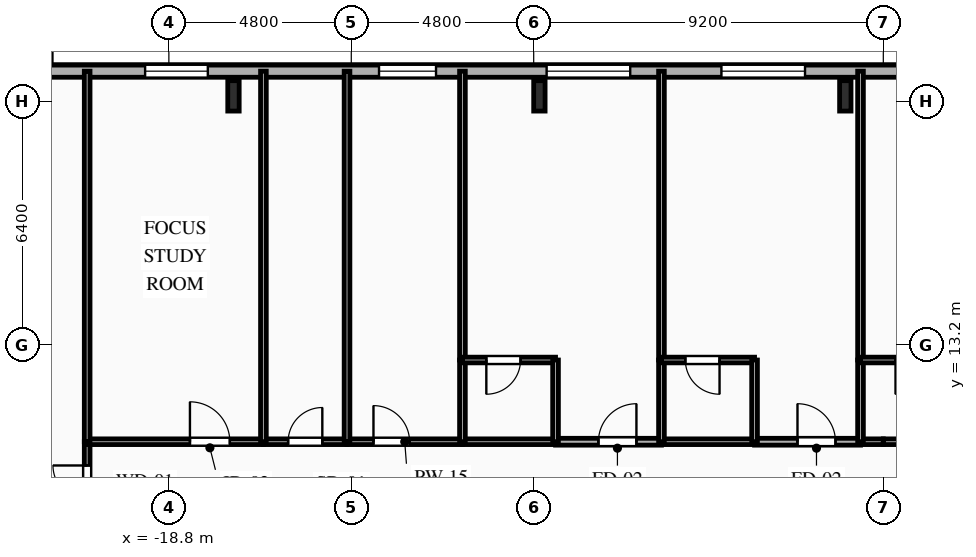
"""IFC4 building model, lengths in metres.
Left out: names, types, materials, properties, quantities, classifications, styles, units other than length and angle.
Written with IfcOpenShell. Run it as: python <this file> out.ifc"""

import sys

from ifc_helpers import new_model, si_unit, direction, frame, frame_2d, origin, origin_2d, place, context, subcontext, project, spatial, rectangle, i_section, extrude, element, fill, save


model = new_model("IFC4")
c1 = context("Model", 3, precision=1e-05, world=origin(), true_north=direction((0.0, 1.0)))
c2 = subcontext(c1, "Body", "Model", "MODEL_VIEW")
j1 = project(units=[si_unit("LENGTHUNIT", "METRE"), si_unit("PLANEANGLEUNIT", "RADIAN")], contexts=[c1])
p1 = place(None, origin())
s1 = spatial("IfcSite", under=j1, at=p1, CompositionType="ELEMENT")
p2 = place(p1, origin())
s2 = spatial("IfcBuilding", under=s1, at=p2, CompositionType="ELEMENT")
p3 = place(p2, frame((0.0, 0.0, 144.4)))
s3 = spatial("IfcBuildingStorey", under=s2, at=p3, CompositionType="ELEMENT", Elevation=144.4)
for number, where, z_axis, x_axis in (
    (1, (-1.0, 19.75, 0.0), (0.0, 0.0, 1.0), (1.0, 0.0, 0.0)),
    (2, (-9.05, 19.75, 0.0), (0.0, 0.0, 1.0), (1.0, 0.0, 0.0)),
    (3, (-17.1, 19.75, 0.0), (0.0, 0.0, 1.0), (1.0, 0.0, 0.0)),
):
    element("IfcColumn", number, at=place(p3, frame(where, z_axis=z_axis, x_axis=x_axis)), inside=s3, PredefinedType="COLUMN", context=c2, shape_type="SweptSolid", body=[
        extrude(i_section(OverallWidth=0.3, OverallDepth=0.8, WebThickness=0.018, FlangeThickness=0.033, FilletRadius=0.03, at=origin_2d()), origin(), (0.0, 0.0, 1.0), 3.35),
    ])
p4 = place(p3, frame((-25.8, 20.4, 0.0), z_axis=(0.0, 0.0, 1.0), x_axis=(1.0, 0.0, 0.0)))
e4 = element("IfcWall", 4, at=p4, inside=s3, PredefinedType="SOLIDWALL", context=c2, shape_type="SweptSolid", body=[
    extrude(rectangle(XDim=49.6, YDim=0.32, at=frame_2d((24.8, 0.0))), origin(), (0.0, 0.0, 1.0), 3.04),
])
p5 = place(p4, frame((2.135, 0.0, 0.85)))
e5 = element("IfcOpeningElement", 5, at=p5, cuts=e4, PredefinedType="OPENING", context=c2, shape_type="SweptSolid", body=[
    extrude(rectangle(XDim=1.65, YDim=1.85, at=frame_2d((0.825, 0.925))), frame((0.0, 0.17, 0.0), z_axis=(0.0, -1.0, 0.0), x_axis=(1.0, 0.0, 0.0)), (0.0, 0.0, 1.0), 0.34),
])
p6 = place(p4, frame((6.375, 0.0, 0.85)))
e6 = element("IfcOpeningElement", 6, at=p6, cuts=e4, PredefinedType="OPENING", context=c2, shape_type="SweptSolid", body=[
    extrude(rectangle(XDim=1.65, YDim=1.85, at=frame_2d((0.825, 0.925))), frame((0.0, 0.17, 0.0), z_axis=(0.0, -1.0, 0.0), x_axis=(1.0, 0.0, 0.0)), (0.0, 0.0, 1.0), 0.34),
])
p7 = place(p4, frame((12.53, 0.0, 0.85)))
e7 = element("IfcOpeningElement", 7, at=p7, cuts=e4, PredefinedType="OPENING", context=c2, shape_type="SweptSolid", body=[
    extrude(rectangle(XDim=1.5, YDim=1.85, at=frame_2d((0.75, 0.925))), frame((0.0, 0.17, 0.0), z_axis=(0.0, -1.0, 0.0), x_axis=(1.0, 0.0, 0.0)), (0.0, 0.0, 1.0), 0.34),
])
p8 = place(p4, frame((16.94, 0.0, 0.85)))
e8 = element("IfcOpeningElement", 8, at=p8, cuts=e4, PredefinedType="OPENING", context=c2, shape_type="SweptSolid", body=[
    extrude(rectangle(XDim=2.2, YDim=1.85, at=frame_2d((1.1, 0.925))), frame((0.0, 0.17, 0.0), z_axis=(0.0, -1.0, 0.0), x_axis=(1.0, 0.0, 0.0)), (0.0, 0.0, 1.0), 0.34),
])
p9 = place(p4, frame((21.54, 0.0, 0.85)))
e9 = element("IfcOpeningElement", 9, at=p9, cuts=e4, PredefinedType="OPENING", context=c2, shape_type="SweptSolid", body=[
    extrude(rectangle(XDim=2.2, YDim=1.85, at=frame_2d((1.1, 0.925))), frame((0.0, 0.17, 0.0), z_axis=(0.0, -1.0, 0.0), x_axis=(1.0, 0.0, 0.0)), (0.0, 0.0, 1.0), 0.34),
])
p10 = place(p4, frame((26.78, 0.0, 0.85)))
e10 = element("IfcOpeningElement", 10, at=p10, cuts=e4, PredefinedType="OPENING", context=c2, shape_type="SweptSolid", body=[
    extrude(rectangle(XDim=2.2, YDim=1.85, at=frame_2d((1.1, 0.925))), frame((0.0, 0.17, 0.0), z_axis=(0.0, -1.0, 0.0), x_axis=(1.0, 0.0, 0.0)), (0.0, 0.0, 1.0), 0.34),
])
p11 = place(p4, frame((33.132, 0.0, 0.85)))
e11 = element("IfcOpeningElement", 11, at=p11, cuts=e4, PredefinedType="OPENING", context=c2, shape_type="SweptSolid", body=[
    extrude(rectangle(XDim=2.2, YDim=1.85, at=frame_2d((1.1, 0.925))), frame((0.0, 0.17, 0.0), z_axis=(0.0, -1.0, 0.0), x_axis=(1.0, 0.0, 0.0)), (0.0, 0.0, 1.0), 0.34),
])
p12 = place(p4, frame((37.22, 0.0, 0.85)))
e12 = element("IfcOpeningElement", 12, at=p12, cuts=e4, PredefinedType="OPENING", context=c2, shape_type="SweptSolid", body=[
    extrude(rectangle(XDim=2.2, YDim=1.85, at=frame_2d((1.1, 0.925))), frame((0.0, 0.17, 0.0), z_axis=(0.0, -1.0, 0.0), x_axis=(1.0, 0.0, 0.0)), (0.0, 0.0, 1.0), 0.34),
])
p13 = place(p4, frame((43.055, 0.0, 0.85)))
e13 = element("IfcOpeningElement", 13, at=p13, cuts=e4, PredefinedType="OPENING", context=c2, shape_type="SweptSolid", body=[
    extrude(rectangle(XDim=1.65, YDim=1.85, at=frame_2d((0.825, 0.925))), frame((0.0, 0.17, 0.0), z_axis=(0.0, -1.0, 0.0), x_axis=(1.0, 0.0, 0.0)), (0.0, 0.0, 1.0), 0.34),
])
p14 = place(p4, frame((47.45, 0.0, 0.85)))
e14 = element("IfcOpeningElement", 14, at=p14, cuts=e4, PredefinedType="OPENING", context=c2, shape_type="SweptSolid", body=[
    extrude(rectangle(XDim=1.1, YDim=1.85, at=frame_2d((0.55, 0.925))), frame((0.0, 0.17, 0.0), z_axis=(0.0, -1.0, 0.0), x_axis=(1.0, 0.0, 0.0)), (0.0, 0.0, 1.0), 0.34),
])
p15 = place(p3, frame((-20.95, 8.5, 0.0), z_axis=(0.0, 0.0, 1.0), x_axis=(0.0, 1.0, 0.0)))
e15 = element("IfcWall", 15, at=p15, inside=s3, PredefinedType="PARTITIONING", context=c2, shape_type="SweptSolid", body=[
    extrude(rectangle(XDim=2.15, YDim=0.15, at=frame_2d((1.075, 0.0))), origin(), (0.0, 0.0, 1.0), 3.04),
])
p16 = place(p15, frame((0.625, 0.0, 0.0)))
e16 = element("IfcOpeningElement", 16, at=p16, cuts=e15, PredefinedType="OPENING", context=c2, shape_type="SweptSolid", body=[
    extrude(rectangle(XDim=0.9, YDim=2.1, at=frame_2d((0.45, 1.05))), frame((0.0, 0.085, 0.0), z_axis=(0.0, -1.0, 0.0), x_axis=(1.0, 0.0, 0.0)), (0.0, 0.0, 1.0), 0.17),
])
p17 = place(p3, frame((-20.95, 10.65, 0.0), z_axis=(0.0, 0.0, 1.0), x_axis=(1.0, 0.0, 0.0)))
e17 = element("IfcWall", 17, at=p17, inside=s3, PredefinedType="PARTITIONING", context=c2, shape_type="SweptSolid", body=[
    extrude(rectangle(XDim=4.638, YDim=0.15, at=frame_2d((2.319, 0.0))), origin(), (0.0, 0.0, 1.0), 3.04),
])
p18 = place(p17, frame((2.705, 0.0, 0.0)))
e18 = element("IfcOpeningElement", 18, at=p18, cuts=e17, PredefinedType="OPENING", context=c2, shape_type="SweptSolid", body=[
    extrude(rectangle(XDim=1.05, YDim=2.15, at=frame_2d((0.525, 1.075))), frame((0.0, 0.085, 0.0), z_axis=(0.0, -1.0, 0.0), x_axis=(1.0, 0.0, 0.0)), (0.0, 0.0, 1.0), 0.17),
])
p19 = place(p3, frame((-16.312, 10.65, 0.0), z_axis=(0.0, 0.0, 1.0), x_axis=(1.0, 0.0, 0.0)))
e19 = element("IfcWall", 19, at=p19, inside=s3, PredefinedType="PLUMBINGWALL", context=c2, shape_type="SweptSolid", body=[
    extrude(rectangle(XDim=2.2, YDim=0.15, at=frame_2d((1.1, 0.0))), origin(), (0.0, 0.0, 1.0), 3.04),
])
p20 = place(p19, frame((0.65, 0.0, 0.0)))
e20 = element("IfcOpeningElement", 20, at=p20, cuts=e19, PredefinedType="OPENING", context=c2, shape_type="SweptSolid", body=[
    extrude(rectangle(XDim=0.9, YDim=2.1, at=frame_2d((0.45, 1.05))), frame((0.0, 0.085, 0.0), z_axis=(0.0, -1.0, 0.0), x_axis=(1.0, 0.0, 0.0)), (0.0, 0.0, 1.0), 0.17),
])
p21 = place(p3, frame((-14.112, 10.65, 0.0), z_axis=(0.0, 0.0, 1.0), x_axis=(1.0, 0.0, 0.0)))
e21 = element("IfcWall", 21, at=p21, inside=s3, PredefinedType="PARTITIONING", context=c2, shape_type="SweptSolid", body=[
    extrude(rectangle(XDim=3.037, YDim=0.15, at=frame_2d((1.519, 0.0))), origin(), (0.0, 0.0, 1.0), 3.04),
])
p22 = place(p21, frame((0.696, 0.0, 0.0)))
e22 = element("IfcOpeningElement", 22, at=p22, cuts=e21, PredefinedType="OPENING", context=c2, shape_type="SweptSolid", body=[
    extrude(rectangle(XDim=0.95, YDim=2.1, at=frame_2d((0.475, 1.05))), frame((0.0, 0.085, 0.0), z_axis=(0.0, -1.0, 0.0), x_axis=(1.0, 0.0, 0.0)), (0.0, 0.0, 1.0), 0.17),
])
p23 = place(p3, frame((-8.625, 10.65, 0.0), z_axis=(0.0, 0.0, 1.0), x_axis=(1.0, 0.0, 0.0)))
e23 = element("IfcWall", 23, at=p23, inside=s3, PredefinedType="PARTITIONING", context=c2, shape_type="SweptSolid", body=[
    extrude(rectangle(XDim=2.787, YDim=0.18, at=frame_2d((1.394, 0.0))), origin(), (0.0, 0.0, 1.0), 3.04),
])
p24 = place(p23, frame((1.129, 0.0, 0.0)))
e24 = element("IfcOpeningElement", 24, at=p24, cuts=e23, PredefinedType="OPENING", context=c2, shape_type="SweptSolid", body=[
    extrude(rectangle(XDim=1.0, YDim=2.15, at=frame_2d((0.5, 1.075))), frame((0.0, 0.1, 0.0), z_axis=(0.0, -1.0, 0.0), x_axis=(1.0, 0.0, 0.0)), (0.0, 0.0, 1.0), 0.2),
])
p25 = place(p3, frame((-11.075, 10.65, 0.0), z_axis=(0.0, 0.0, 1.0), x_axis=(1.0, 0.0, 0.0)))
e25 = element("IfcWall", 25, at=p25, inside=s3, PredefinedType="PLUMBINGWALL", context=c2, shape_type="SweptSolid", body=[
    extrude(rectangle(XDim=2.45, YDim=0.15, at=frame_2d((1.225, 0.0))), origin(), (0.0, 0.0, 1.0), 3.04),
])
p26 = place(p3, frame((-3.388, 10.65, 0.0), z_axis=(0.0, 0.0, 1.0), x_axis=(1.0, 0.0, 0.0)))
e26 = element("IfcWall", 26, at=p26, inside=s3, PredefinedType="PARTITIONING", context=c2, shape_type="SweptSolid", body=[
    extrude(rectangle(XDim=2.788, YDim=0.18, at=frame_2d((1.394, 0.0))), origin(), (0.0, 0.0, 1.0), 3.04),
])
p27 = place(p26, frame((1.129, 0.0, 0.0)))
e27 = element("IfcOpeningElement", 27, at=p27, cuts=e26, PredefinedType="OPENING", context=c2, shape_type="SweptSolid", body=[
    extrude(rectangle(XDim=1.0, YDim=2.15, at=frame_2d((0.5, 1.075))), frame((0.0, 0.1, 0.0), z_axis=(0.0, -1.0, 0.0), x_axis=(1.0, 0.0, 0.0)), (0.0, 0.0, 1.0), 0.2),
])
p28 = place(p3, frame((-5.838, 10.65, 0.0), z_axis=(0.0, 0.0, 1.0), x_axis=(1.0, 0.0, 0.0)))
e28 = element("IfcWall", 28, at=p28, inside=s3, PredefinedType="PLUMBINGWALL", context=c2, shape_type="SweptSolid", body=[
    extrude(rectangle(XDim=2.45, YDim=0.15, at=frame_2d((1.225, 0.0))), origin(), (0.0, 0.0, 1.0), 3.04),
])
p29 = place(p3, frame((-0.6, 10.65, 0.0), z_axis=(0.0, 0.0, 1.0), x_axis=(1.0, 0.0, 0.0)))
e29 = element("IfcWall", 29, at=p29, inside=s3, PredefinedType="PLUMBINGWALL", context=c2, shape_type="SweptSolid", body=[
    extrude(rectangle(XDim=0.6, YDim=0.15, at=frame_2d((0.3, 0.0))), origin(), (0.0, 0.0, 1.0), 3.04),
])
p30 = place(p3, frame((0.0, 10.65, 0.0), z_axis=(0.0, 0.0, 1.0), x_axis=(1.0, 0.0, 0.0)))
e30 = element("IfcWall", 30, at=p30, inside=s3, PredefinedType="PLUMBINGWALL", context=c2, shape_type="SweptSolid", body=[
    extrude(rectangle(XDim=1.85, YDim=0.15, at=frame_2d((0.925, 0.0))), origin(), (0.0, 0.0, 1.0), 3.04),
])
p31 = place(p3, frame((-20.95, 20.4, 0.0), z_axis=(0.0, 0.0, 1.0), x_axis=(0.0, -1.0, 0.0)))
e31 = element("IfcWall", 31, at=p31, inside=s3, PredefinedType="PARTITIONING", context=c2, shape_type="SweptSolid", body=[
    extrude(rectangle(XDim=9.75, YDim=0.15, at=frame_2d((4.875, 0.0))), origin(), (0.0, 0.0, 1.0), 3.04),
])
for number, where, z_axis, x_axis in (
    (32, (-16.312, 20.4, 0.0), (0.0, 0.0, 1.0), (0.0, -1.0, 0.0)),
    (33, (-14.112, 20.4, 0.0), (0.0, 0.0, 1.0), (0.0, -1.0, 0.0)),
):
    element("IfcWall", number, at=place(p3, frame(where, z_axis=z_axis, x_axis=x_axis)), inside=s3, PredefinedType="PLUMBINGWALL", context=c2, shape_type="SweptSolid", body=[
        extrude(rectangle(XDim=9.75, YDim=0.15, at=frame_2d((4.875, 0.0))), origin(), (0.0, 0.0, 1.0), 3.04),
    ])
p32 = place(p3, frame((-11.075, 20.4, 0.0), z_axis=(0.0, 0.0, 1.0), x_axis=(0.0, -1.0, 0.0)))
e34 = element("IfcWall", 34, at=p32, inside=s3, PredefinedType="PARTITIONING", context=c2, shape_type="SweptSolid", body=[
    extrude(rectangle(XDim=7.6, YDim=0.15, at=frame_2d((3.8, 0.0))), origin(), (0.0, 0.0, 1.0), 3.04),
])
p33 = place(p3, frame((-11.075, 12.8, 0.0), z_axis=(0.0, 0.0, 1.0), x_axis=(0.0, -1.0, 0.0)))
e35 = element("IfcWall", 35, at=p33, inside=s3, PredefinedType="PLUMBINGWALL", context=c2, shape_type="SweptSolid", body=[
    extrude(rectangle(XDim=2.15, YDim=0.15, at=frame_2d((1.075, 0.0))), origin(), (0.0, 0.0, 1.0), 3.04),
])
p34 = place(p3, frame((-8.625, 12.8, 0.0), z_axis=(0.0, 0.0, 1.0), x_axis=(-1.0, 0.0, 0.0)))
e36 = element("IfcWall", 36, at=p34, inside=s3, PredefinedType="PLUMBINGWALL", context=c2, shape_type="SweptSolid", body=[
    extrude(rectangle(XDim=2.45, YDim=0.15, at=frame_2d((1.225, 0.0))), origin(), (0.0, 0.0, 1.0), 3.04),
])
p35 = place(p34, frame((0.921, 0.0, 0.0)))
e37 = element("IfcOpeningElement", 37, at=p35, cuts=e36, PredefinedType="OPENING", context=c2, shape_type="SweptSolid", body=[
    extrude(rectangle(XDim=0.9, YDim=2.1, at=frame_2d((0.45, 1.05))), frame((0.0, 0.085, 0.0), z_axis=(0.0, -1.0, 0.0), x_axis=(1.0, 0.0, 0.0)), (0.0, 0.0, 1.0), 0.17),
])
p36 = place(p3, frame((-8.625, 10.65, 0.0), z_axis=(0.0, 0.0, 1.0), x_axis=(0.0, 1.0, 0.0)))
e38 = element("IfcWall", 38, at=p36, inside=s3, PredefinedType="PLUMBINGWALL", context=c2, shape_type="SweptSolid", body=[
    extrude(rectangle(XDim=2.15, YDim=0.15, at=frame_2d((1.075, 0.0))), origin(), (0.0, 0.0, 1.0), 3.04),
])
p37 = place(p3, frame((-5.838, 20.4, 0.0), z_axis=(0.0, 0.0, 1.0), x_axis=(0.0, -1.0, 0.0)))
e39 = element("IfcWall", 39, at=p37, inside=s3, PredefinedType="PARTITIONING", context=c2, shape_type="SweptSolid", body=[
    extrude(rectangle(XDim=7.6, YDim=0.15, at=frame_2d((3.8, 0.0))), origin(), (0.0, 0.0, 1.0), 3.04),
])
p38 = place(p3, frame((-5.838, 12.8, 0.0), z_axis=(0.0, 0.0, 1.0), x_axis=(0.0, -1.0, 0.0)))
e40 = element("IfcWall", 40, at=p38, inside=s3, PredefinedType="PLUMBINGWALL", context=c2, shape_type="SweptSolid", body=[
    extrude(rectangle(XDim=2.15, YDim=0.15, at=frame_2d((1.075, 0.0))), origin(), (0.0, 0.0, 1.0), 3.04),
])
p39 = place(p3, frame((-3.388, 12.8, 0.0), z_axis=(0.0, 0.0, 1.0), x_axis=(-1.0, 0.0, 0.0)))
e41 = element("IfcWall", 41, at=p39, inside=s3, PredefinedType="PLUMBINGWALL", context=c2, shape_type="SweptSolid", body=[
    extrude(rectangle(XDim=2.45, YDim=0.15, at=frame_2d((1.225, 0.0))), origin(), (0.0, 0.0, 1.0), 3.04),
])
p40 = place(p39, frame((0.921, 0.0, 0.0)))
e42 = element("IfcOpeningElement", 42, at=p40, cuts=e41, PredefinedType="OPENING", context=c2, shape_type="SweptSolid", body=[
    extrude(rectangle(XDim=0.9, YDim=2.1, at=frame_2d((0.45, 1.05))), frame((0.0, 0.085, 0.0), z_axis=(0.0, -1.0, 0.0), x_axis=(1.0, 0.0, 0.0)), (0.0, 0.0, 1.0), 0.17),
])
p41 = place(p3, frame((-3.388, 10.65, 0.0), z_axis=(0.0, 0.0, 1.0), x_axis=(0.0, 1.0, 0.0)))
e43 = element("IfcWall", 43, at=p41, inside=s3, PredefinedType="PLUMBINGWALL", context=c2, shape_type="SweptSolid", body=[
    extrude(rectangle(XDim=2.15, YDim=0.15, at=frame_2d((1.075, 0.0))), origin(), (0.0, 0.0, 1.0), 3.04),
])
p42 = place(p3, frame((-0.6, 20.4, 0.0), z_axis=(0.0, 0.0, 1.0), x_axis=(0.0, -1.0, 0.0)))
e44 = element("IfcWall", 44, at=p42, inside=s3, PredefinedType="PARTITIONING", context=c2, shape_type="SweptSolid", body=[
    extrude(rectangle(XDim=7.6, YDim=0.15, at=frame_2d((3.8, 0.0))), origin(), (0.0, 0.0, 1.0), 3.04),
])
p43 = place(p3, frame((-0.6, 12.8, 0.0), z_axis=(0.0, 0.0, 1.0), x_axis=(0.0, -1.0, 0.0)))
e45 = element("IfcWall", 45, at=p43, inside=s3, PredefinedType="PLUMBINGWALL", context=c2, shape_type="SweptSolid", body=[
    extrude(rectangle(XDim=2.15, YDim=0.15, at=frame_2d((1.075, 0.0))), origin(), (0.0, 0.0, 1.0), 3.04),
])
p44 = place(p3, frame((1.85, 12.8, 0.0), z_axis=(0.0, 0.0, 1.0), x_axis=(-1.0, 0.0, 0.0)))
e46 = element("IfcWall", 46, at=p44, inside=s3, PredefinedType="PLUMBINGWALL", context=c2, shape_type="SweptSolid", body=[
    extrude(rectangle(XDim=2.45, YDim=0.15, at=frame_2d((1.225, 0.0))), origin(), (0.0, 0.0, 1.0), 3.04),
])
p45 = place(p44, frame((0.629, 0.0, 0.0)))
e47 = element("IfcOpeningElement", 47, at=p45, cuts=e46, PredefinedType="OPENING", context=c2, shape_type="SweptSolid", body=[
    extrude(rectangle(XDim=0.9, YDim=2.1, at=frame_2d((0.45, 1.05))), frame((0.0, 0.085, 0.0), z_axis=(0.0, -1.0, 0.0), x_axis=(1.0, 0.0, 0.0)), (0.0, 0.0, 1.0), 0.17),
])
p46 = place(p6, origin())
e48 = element("IfcWindow", 48, at=p46, inside=s3, PartitioningType="SINGLE_PANEL", PredefinedType="WINDOW", context=c2, shape_type="SweptSolid", body=[
    extrude(rectangle(XDim=1.65, YDim=1.85, at=frame_2d((0.825, 0.925))), frame((0.0, 0.03, 0.0), z_axis=(0.0, -1.0, 0.0), x_axis=(1.0, 0.0, 0.0)), (0.0, 0.0, 1.0), 0.06),
])
fill(e6, e48)
p47 = place(p7, origin())
e49 = element("IfcWindow", 49, at=p47, inside=s3, PartitioningType="SINGLE_PANEL", PredefinedType="WINDOW", context=c2, shape_type="SweptSolid", body=[
    extrude(rectangle(XDim=1.5, YDim=1.85, at=frame_2d((0.75, 0.925))), frame((0.0, 0.03, 0.0), z_axis=(0.0, -1.0, 0.0), x_axis=(1.0, 0.0, 0.0)), (0.0, 0.0, 1.0), 0.06),
])
fill(e7, e49)
p48 = place(p8, origin())
e50 = element("IfcWindow", 50, at=p48, inside=s3, PartitioningType="SINGLE_PANEL", PredefinedType="WINDOW", context=c2, shape_type="SweptSolid", body=[
    extrude(rectangle(XDim=2.2, YDim=1.85, at=frame_2d((1.1, 0.925))), frame((0.0, 0.03, 0.0), z_axis=(0.0, -1.0, 0.0), x_axis=(1.0, 0.0, 0.0)), (0.0, 0.0, 1.0), 0.06),
])
fill(e8, e50)
p49 = place(p9, origin())
e51 = element("IfcWindow", 51, at=p49, inside=s3, PartitioningType="SINGLE_PANEL", PredefinedType="WINDOW", context=c2, shape_type="SweptSolid", body=[
    extrude(rectangle(XDim=2.2, YDim=1.85, at=frame_2d((1.1, 0.925))), frame((0.0, 0.03, 0.0), z_axis=(0.0, -1.0, 0.0), x_axis=(1.0, 0.0, 0.0)), (0.0, 0.0, 1.0), 0.06),
])
fill(e9, e51)
p50 = place(p16, origin())
e52 = element("IfcDoor", 52, at=p50, inside=s3, OperationType="SINGLE_SWING_RIGHT", PredefinedType="DOOR", context=c2, shape_type="SweptSolid", body=[
    extrude(rectangle(XDim=0.9, YDim=2.1, at=frame_2d((0.45, 1.05))), frame((0.0, 0.025, 0.0), z_axis=(0.0, -1.0, 0.0), x_axis=(1.0, 0.0, 0.0)), (0.0, 0.0, 1.0), 0.05),
])
fill(e16, e52)
p51 = place(p18, origin())
e53 = element("IfcDoor", 53, at=p51, inside=s3, OperationType="SINGLE_SWING_LEFT", PredefinedType="DOOR", context=c2, shape_type="SweptSolid", body=[
    extrude(rectangle(XDim=1.05, YDim=2.15, at=frame_2d((0.525, 1.075))), frame((0.0, 0.025, 0.0), z_axis=(0.0, -1.0, 0.0), x_axis=(1.0, 0.0, 0.0)), (0.0, 0.0, 1.0), 0.05),
])
fill(e18, e53)
p52 = place(p20, origin())
e54 = element("IfcDoor", 54, at=p52, inside=s3, OperationType="SINGLE_SWING_RIGHT", PredefinedType="DOOR", context=c2, shape_type="SweptSolid", body=[
    extrude(rectangle(XDim=0.9, YDim=2.1, at=frame_2d((0.45, 1.05))), frame((0.0, 0.025, 0.0), z_axis=(0.0, -1.0, 0.0), x_axis=(1.0, 0.0, 0.0)), (0.0, 0.0, 1.0), 0.05),
])
fill(e20, e54)
p53 = place(p22, origin())
e55 = element("IfcDoor", 55, at=p53, inside=s3, OperationType="SINGLE_SWING_LEFT", PredefinedType="DOOR", context=c2, shape_type="SweptSolid", body=[
    extrude(rectangle(XDim=0.95, YDim=2.1, at=frame_2d((0.475, 1.05))), frame((0.0, 0.025, 0.0), z_axis=(0.0, -1.0, 0.0), x_axis=(1.0, 0.0, 0.0)), (0.0, 0.0, 1.0), 0.05),
])
fill(e22, e55)
p54 = place(p24, origin())
e56 = element("IfcDoor", 56, at=p54, inside=s3, OperationType="SINGLE_SWING_RIGHT", PredefinedType="DOOR", context=c2, shape_type="SweptSolid", body=[
    extrude(rectangle(XDim=1.0, YDim=2.15, at=frame_2d((0.5, 1.075))), frame((0.0, 0.025, 0.0), z_axis=(0.0, -1.0, 0.0), x_axis=(1.0, 0.0, 0.0)), (0.0, 0.0, 1.0), 0.05),
])
fill(e24, e56)
p55 = place(p27, origin())
e57 = element("IfcDoor", 57, at=p55, inside=s3, OperationType="SINGLE_SWING_LEFT", PredefinedType="DOOR", context=c2, shape_type="SweptSolid", body=[
    extrude(rectangle(XDim=1.0, YDim=2.15, at=frame_2d((0.5, 1.075))), frame((0.0, 0.025, 0.0), z_axis=(0.0, -1.0, 0.0), x_axis=(1.0, 0.0, 0.0)), (0.0, 0.0, 1.0), 0.05),
])
fill(e27, e57)
p56 = place(p35, origin())
e58 = element("IfcDoor", 58, at=p56, inside=s3, OperationType="SINGLE_SWING_RIGHT", PredefinedType="DOOR", context=c2, shape_type="SweptSolid", body=[
    extrude(rectangle(XDim=0.9, YDim=2.1, at=frame_2d((0.45, 1.05))), frame((0.0, 0.025, 0.0), z_axis=(0.0, -1.0, 0.0), x_axis=(1.0, 0.0, 0.0)), (0.0, 0.0, 1.0), 0.05),
])
fill(e37, e58)
p57 = place(p40, origin())
e59 = element("IfcDoor", 59, at=p57, inside=s3, OperationType="SINGLE_SWING_LEFT", PredefinedType="DOOR", context=c2, shape_type="SweptSolid", body=[
    extrude(rectangle(XDim=0.9, YDim=2.1, at=frame_2d((0.45, 1.05))), frame((0.0, 0.025, 0.0), z_axis=(0.0, -1.0, 0.0), x_axis=(1.0, 0.0, 0.0)), (0.0, 0.0, 1.0), 0.05),
])
fill(e42, e59)
p58 = place(p45, origin())
e60 = element("IfcDoor", 60, at=p58, inside=s3, OperationType="SINGLE_SWING_RIGHT", PredefinedType="DOOR", context=c2, shape_type="SweptSolid", body=[
    extrude(rectangle(XDim=0.9, YDim=2.1, at=frame_2d((0.45, 1.05))), frame((0.0, 0.025, 0.0), z_axis=(0.0, -1.0, 0.0), x_axis=(1.0, 0.0, 0.0)), (0.0, 0.0, 1.0), 0.05),
])
fill(e47, e60)
save(model, sys.argv[1])
